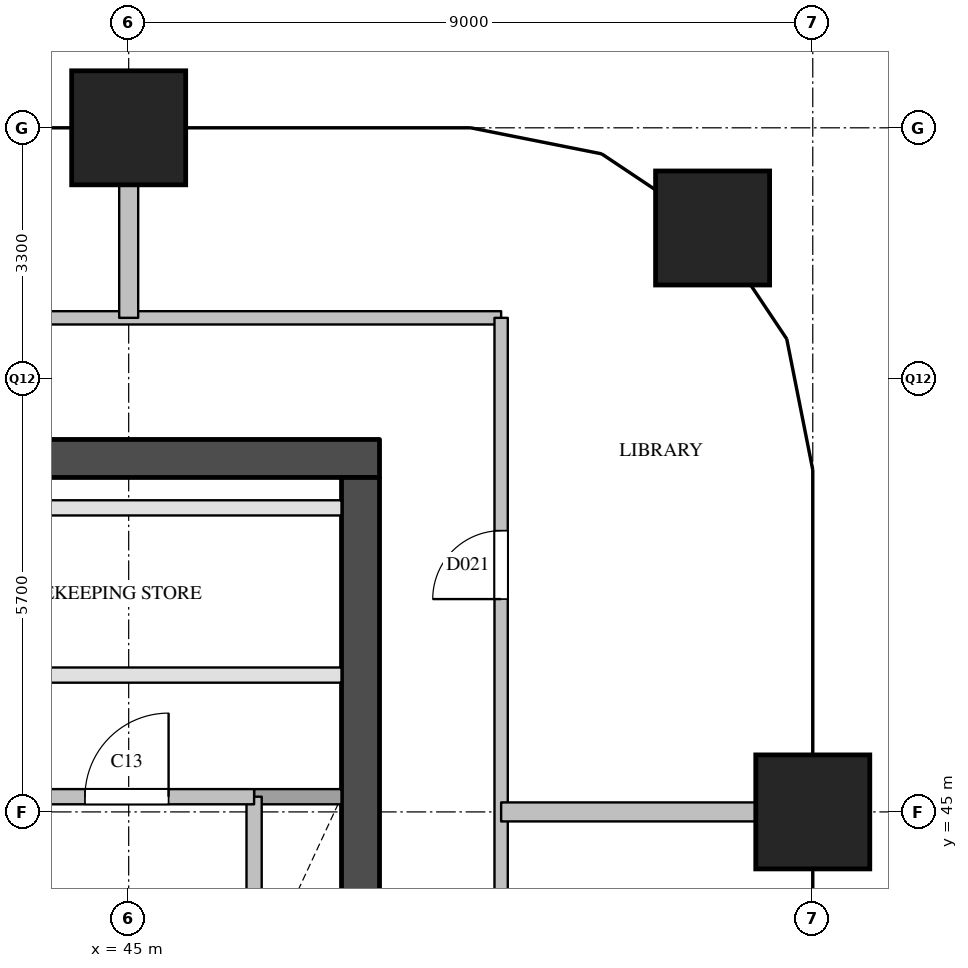
"""IFC4 building model, lengths in metres.
Left out: names, types, materials, properties, quantities, classifications, styles, units other than length and angle.
Written with IfcOpenShell. Run it as: python <this file> out.ifc"""

import sys

from ifc_helpers import new_model, si_unit, direction, frame, frame_2d, origin, origin_2d, place, context, subcontext, project, spatial, rectangle, extrude, element, fill, save


model = new_model("IFC4")
c1 = context("Model", 3, precision=1e-05, world=origin(), true_north=direction((0.0, 1.0)))
c2 = subcontext(c1, "Body", "Model", "MODEL_VIEW")
j1 = project(units=[si_unit("LENGTHUNIT", "METRE"), si_unit("PLANEANGLEUNIT", "RADIAN")], contexts=[c1])
p1 = place(None, origin())
s1 = spatial("IfcSite", under=j1, at=p1, CompositionType="ELEMENT")
p2 = place(p1, origin())
s2 = spatial("IfcBuilding", under=s1, at=p2, CompositionType="ELEMENT")
p3 = place(p2, frame((0.0, 0.0, 134.9)))
s3 = spatial("IfcBuildingStorey", under=s2, at=p3, CompositionType="ELEMENT", Elevation=134.9)
for number, where, z_axis, x_axis in (
    (1, (45.0, 54.0, 0.0), (0.0, 0.0, 1.0), (1.0, 0.0, 0.0)),
    (2, (54.0, 45.0, 0.0), (0.0, 0.0, 1.0), (1.0, 0.0, 0.0)),
    (3, (52.682, 52.682, 0.0), (0.0, 0.0, 1.0), (1.0, 0.0, 0.0)),
):
    element("IfcColumn", number, at=place(p3, frame(where, z_axis=z_axis, x_axis=x_axis)), inside=s3, PredefinedType="COLUMN", context=c2, shape_type="SweptSolid", body=[
        extrude(rectangle(XDim=1.5, YDim=1.5, at=origin_2d()), origin(), (0.0, 0.0, 1.0), 3.9),
    ])
p4 = place(p3, frame((36.1, 49.65, 0.0), z_axis=(0.0, 0.0, 1.0), x_axis=(1.0, 0.0, 0.0)))
e4 = element("IfcWall", 4, at=p4, inside=s3, PredefinedType="SHEAR", context=c2, shape_type="SweptSolid", body=[
    extrude(rectangle(XDim=12.2, YDim=0.5, at=frame_2d((6.1, 0.0))), origin(), (0.0, 0.0, 1.0), 3.6),
])
p5 = place(p3, frame((48.05, 29.1, 0.0), z_axis=(0.0, 0.0, 1.0), x_axis=(0.0, 1.0, 0.0)))
e5 = element("IfcWall", 5, at=p5, inside=s3, PredefinedType="SHEAR", context=c2, shape_type="SweptSolid", body=[
    extrude(rectangle(XDim=20.3, YDim=0.5, at=frame_2d((10.15, 0.0))), origin(), (0.0, 0.0, 1.0), 3.6),
])
p6 = place(p5, frame((12.5, 0.0, 0.0)))
e6 = element("IfcOpeningElement", 6, at=p6, cuts=e5, PredefinedType="OPENING", context=c2, shape_type="SweptSolid", body=[
    extrude(rectangle(XDim=0.7, YDim=2.1, at=frame_2d((0.35, 1.05))), frame((0.0, 0.26, 0.0), z_axis=(0.0, -1.0, 0.0), x_axis=(1.0, 0.0, 0.0)), (0.0, 0.0, 1.0), 0.52),
])
p7 = place(p5, frame((3.9, 0.0, 0.0)))
e7 = element("IfcOpeningElement", 7, at=p7, cuts=e5, PredefinedType="OPENING", context=c2, shape_type="SweptSolid", body=[
    extrude(rectangle(XDim=1.8, YDim=2.1, at=frame_2d((0.9, 1.05))), frame((0.0, 0.26, 0.0), z_axis=(0.0, -1.0, 0.0), x_axis=(1.0, 0.0, 0.0)), (0.0, 0.0, 1.0), 0.52),
])
p8 = place(p3, frame((46.65, 40.78, 0.0), z_axis=(0.0, 0.0, 1.0), x_axis=(0.0, 1.0, 0.0)))
e8 = element("IfcWall", 8, at=p8, inside=s3, PredefinedType="SOLIDWALL", context=c2, shape_type="SweptSolid", body=[
    extrude(rectangle(XDim=4.42, YDim=0.2, at=frame_2d((2.21, 0.0))), origin(), (0.0, 0.0, 1.0), 3.6),
])
p9 = place(p3, frame((46.65, 45.2, 0.0), z_axis=(0.0, 0.0, 1.0), x_axis=(1.0, 0.0, 0.0)))
e9 = element("IfcWall", 9, at=p9, inside=s3, PredefinedType="SOLIDWALL", context=c2, shape_type="SweptSolid", body=[
    extrude(rectangle(XDim=1.15, YDim=0.2, at=frame_2d((0.575, 0.0))), origin(), (0.0, 0.0, 1.0), 3.6),
])
p10 = place(p3, frame((36.6, 45.2, 0.0), z_axis=(0.0, 0.0, 1.0), x_axis=(1.0, 0.0, 0.0)))
e10 = element("IfcWall", 10, at=p10, inside=s3, PredefinedType="SOLIDWALL", context=c2, shape_type="SweptSolid", body=[
    extrude(rectangle(XDim=10.05, YDim=0.2, at=frame_2d((5.025, 0.0))), origin(), (0.0, 0.0, 1.0), 3.6),
])
p11 = place(p10, frame((1.125, 0.0, 0.0)))
e11 = element("IfcOpeningElement", 11, at=p11, cuts=e10, PredefinedType="OPENING", context=c2, shape_type="SweptSolid", body=[
    extrude(rectangle(XDim=1.1, YDim=2.1, at=frame_2d((0.55, 1.05))), frame((0.0, 0.11, 0.0), z_axis=(0.0, -1.0, 0.0), x_axis=(1.0, 0.0, 0.0)), (0.0, 0.0, 1.0), 0.22),
])
p12 = place(p10, frame((4.475, 0.0, 0.0)))
e12 = element("IfcOpeningElement", 12, at=p12, cuts=e10, PredefinedType="OPENING", context=c2, shape_type="SweptSolid", body=[
    extrude(rectangle(XDim=1.1, YDim=2.1, at=frame_2d((0.55, 1.05))), frame((0.0, 0.11, 0.0), z_axis=(0.0, -1.0, 0.0), x_axis=(1.0, 0.0, 0.0)), (0.0, 0.0, 1.0), 0.22),
])
p13 = place(p10, frame((7.825, 0.0, 0.0)))
e13 = element("IfcOpeningElement", 13, at=p13, cuts=e10, PredefinedType="OPENING", context=c2, shape_type="SweptSolid", body=[
    extrude(rectangle(XDim=1.1, YDim=2.1, at=frame_2d((0.55, 1.05))), frame((0.0, 0.11, 0.0), z_axis=(0.0, -1.0, 0.0), x_axis=(1.0, 0.0, 0.0)), (0.0, 0.0, 1.0), 0.22),
])
p14 = place(p3, frame((36.6, 46.8, 0.0), z_axis=(0.0, 0.0, 1.0), x_axis=(1.0, 0.0, 0.0)))
e14 = element("IfcWall", 14, at=p14, inside=s3, PredefinedType="PARTITIONING", context=c2, shape_type="SweptSolid", body=[
    extrude(rectangle(XDim=11.2, YDim=0.2, at=frame_2d((5.6, 0.0))), origin(), (0.0, 0.0, 1.0), 3.6),
])
p15 = place(p14, frame((0.67, 0.0, 0.0)))
e15 = element("IfcOpeningElement", 15, at=p15, cuts=e14, PredefinedType="OPENING", context=c2, shape_type="SweptSolid", body=[
    extrude(rectangle(XDim=0.9, YDim=2.1, at=frame_2d((0.45, 1.05))), frame((0.0, 0.11, 0.0), z_axis=(0.0, -1.0, 0.0), x_axis=(1.0, 0.0, 0.0)), (0.0, 0.0, 1.0), 0.22),
])
p16 = place(p14, frame((6.27, 0.0, 0.0)))
e16 = element("IfcOpeningElement", 16, at=p16, cuts=e14, PredefinedType="OPENING", context=c2, shape_type="SweptSolid", body=[
    extrude(rectangle(XDim=0.9, YDim=2.1, at=frame_2d((0.45, 1.05))), frame((0.0, 0.11, 0.0), z_axis=(0.0, -1.0, 0.0), x_axis=(1.0, 0.0, 0.0)), (0.0, 0.0, 1.0), 0.22),
])
p17 = place(p3, frame((36.6, 49.0, 0.0), z_axis=(0.0, 0.0, 1.0), x_axis=(1.0, 0.0, 0.0)))
e17 = element("IfcWall", 17, at=p17, inside=s3, PredefinedType="PARTITIONING", context=c2, shape_type="SweptSolid", body=[
    extrude(rectangle(XDim=11.2, YDim=0.2, at=frame_2d((5.6, 0.0))), origin(), (0.0, 0.0, 1.0), 3.6),
])
p18 = place(p3, frame((34.5, 51.5, 0.0), z_axis=(0.0, 0.0, 1.0), x_axis=(1.0, 0.0, 0.0)))
e18 = element("IfcWall", 18, at=p18, inside=s3, PredefinedType="PARTITIONING", context=c2, shape_type="SweptSolid", body=[
    extrude(rectangle(XDim=15.4, YDim=0.175, at=frame_2d((7.7, 0.0))), origin(), (0.0, 0.0, 1.0), 3.6),
])
p19 = place(p18, frame((5.0, 0.0, 0.0)))
e19 = element("IfcOpeningElement", 19, at=p19, cuts=e18, PredefinedType="OPENING", context=c2, shape_type="SweptSolid", body=[
    extrude(rectangle(XDim=1.0, YDim=2.1, at=frame_2d((0.5, 1.05))), frame((0.0, 0.097, 0.0), z_axis=(0.0, -1.0, 0.0), x_axis=(1.0, 0.0, 0.0)), (0.0, 0.0, 1.0), 0.195),
])
p20 = place(p3, frame((49.9, 28.5, 0.0), z_axis=(0.0, 0.0, 1.0), x_axis=(0.0, 1.0, 0.0)))
e20 = element("IfcWall", 20, at=p20, inside=s3, PredefinedType="PARTITIONING", context=c2, shape_type="SweptSolid", body=[
    extrude(rectangle(XDim=23.0, YDim=0.175, at=frame_2d((11.5, 0.0))), origin(), (0.0, 0.0, 1.0), 3.6),
])
p21 = place(p20, frame((2.8, 0.0, 0.0)))
e21 = element("IfcOpeningElement", 21, at=p21, cuts=e20, PredefinedType="OPENING", context=c2, shape_type="SweptSolid", body=[
    extrude(rectangle(XDim=0.9, YDim=2.1, at=frame_2d((0.45, 1.05))), frame((0.0, 0.097, 0.0), z_axis=(0.0, -1.0, 0.0), x_axis=(1.0, 0.0, 0.0)), (0.0, 0.0, 1.0), 0.195),
])
p22 = place(p20, frame((11.05, 0.0, 0.0)))
e22 = element("IfcOpeningElement", 22, at=p22, cuts=e20, PredefinedType="OPENING", context=c2, shape_type="SweptSolid", body=[
    extrude(rectangle(XDim=0.9, YDim=2.1, at=frame_2d((0.45, 1.05))), frame((0.0, 0.097, 0.0), z_axis=(0.0, -1.0, 0.0), x_axis=(1.0, 0.0, 0.0)), (0.0, 0.0, 1.0), 0.195),
])
p23 = place(p20, frame((19.3, 0.0, 0.0)))
e23 = element("IfcOpeningElement", 23, at=p23, cuts=e20, PredefinedType="OPENING", context=c2, shape_type="SweptSolid", body=[
    extrude(rectangle(XDim=0.9, YDim=2.1, at=frame_2d((0.45, 1.05))), frame((0.0, 0.097, 0.0), z_axis=(0.0, -1.0, 0.0), x_axis=(1.0, 0.0, 0.0)), (0.0, 0.0, 1.0), 0.195),
])
p24 = place(p3, frame((49.9, 45.0, 0.0), z_axis=(0.0, 0.0, 1.0), x_axis=(1.0, 0.0, 0.0)))
e24 = element("IfcWall", 24, at=p24, inside=s3, PredefinedType="PARTITIONING", context=c2, shape_type="SweptSolid", body=[
    extrude(rectangle(XDim=4.1, YDim=0.25, at=frame_2d((2.05, 0.0))), origin(), (0.0, 0.0, 1.0), 3.6),
])
p25 = place(p3, frame((45.0, 51.5, 0.0), z_axis=(0.0, 0.0, 1.0), x_axis=(0.0, 1.0, 0.0)))
e25 = element("IfcWall", 25, at=p25, inside=s3, PredefinedType="PARTITIONING", context=c2, shape_type="SweptSolid", body=[
    extrude(rectangle(XDim=2.5, YDim=0.25, at=frame_2d((1.25, 0.0))), origin(), (0.0, 0.0, 1.0), 3.6),
])
p26 = place(p13, origin())
e26 = element("IfcDoor", 26, at=p26, inside=s3, OperationType="SINGLE_SWING_RIGHT", PredefinedType="DOOR", context=c2, shape_type="SweptSolid", body=[
    extrude(rectangle(XDim=1.1, YDim=2.1, at=frame_2d((0.55, 1.05))), frame((0.0, 0.025, 0.0), z_axis=(0.0, -1.0, 0.0), x_axis=(1.0, 0.0, 0.0)), (0.0, 0.0, 1.0), 0.05),
])
fill(e13, e26)
p27 = place(p23, origin())
e27 = element("IfcDoor", 27, at=p27, inside=s3, OperationType="SINGLE_SWING_LEFT", PredefinedType="DOOR", context=c2, shape_type="SweptSolid", body=[
    extrude(rectangle(XDim=0.9, YDim=2.1, at=frame_2d((0.45, 1.05))), frame((0.0, 0.025, 0.0), z_axis=(0.0, -1.0, 0.0), x_axis=(1.0, 0.0, 0.0)), (0.0, 0.0, 1.0), 0.05),
])
fill(e23, e27)
save(model, sys.argv[1])
